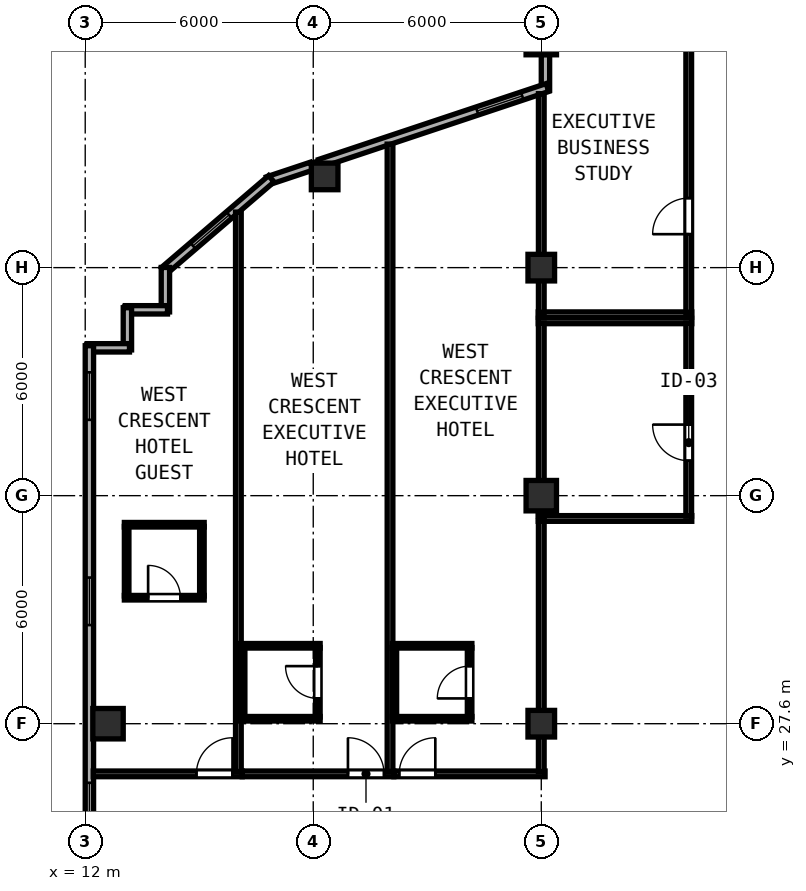
"""IFC4 building model, lengths in metres.
Left out: names, types, materials, properties, quantities, classifications, styles, units other than length and angle.
Written with IfcOpenShell. Run it as: python <this file> out.ifc"""

import sys

from ifc_helpers import new_model, si_unit, direction, frame, frame_2d, origin, origin_2d, place, context, subcontext, project, spatial, rectangle, hollow_rectangle, extrude, element, fill, save


model = new_model("IFC4")
c1 = context("Model", 3, precision=1e-05, world=origin(), true_north=direction((0.0, 1.0)))
c2 = subcontext(c1, "Body", "Model", "MODEL_VIEW")
j1 = project(units=[si_unit("LENGTHUNIT", "METRE"), si_unit("PLANEANGLEUNIT", "RADIAN")], contexts=[c1])
p1 = place(None, origin())
s1 = spatial("IfcSite", under=j1, at=p1, CompositionType="ELEMENT")
p2 = place(p1, origin())
s2 = spatial("IfcBuilding", under=s1, at=p2, CompositionType="ELEMENT")
p3 = place(p2, frame((0.0, 0.0, 269.85)))
s3 = spatial("IfcBuildingStorey", under=s2, at=p3, CompositionType="ELEMENT", Elevation=269.85)
for number, where, z_axis, x_axis in (
    (1, (24.0, 33.6, 0.0), (0.0, 0.0, 1.0), (1.0, 0.0, 0.0)),
    (2, (24.0, 45.6, 0.0), (0.0, 0.0, 1.0), (1.0, 0.0, 0.0)),
    (3, (12.6, 27.6, 0.0), (0.0, 0.0, 1.0), (1.0, 0.0, 0.0)),
):
    element("IfcColumn", number, at=place(p3, frame(where, z_axis=z_axis, x_axis=x_axis)), inside=s3, PredefinedType="COLUMN", context=c2, shape_type="SweptSolid", body=[
        extrude(hollow_rectangle(XDim=0.8, YDim=0.8, WallThickness=0.03, at=origin_2d()), origin(), (0.0, 0.0, 1.0), 3.85),
    ])
for number, where, z_axis, x_axis in (
    (4, (24.0, 27.6, 0.0), (0.0, 0.0, 1.0), (1.0, 0.0, 0.0)),
    (5, (24.0, 39.6, 0.0), (0.0, 0.0, 1.0), (1.0, 0.0, 0.0)),
    (6, (18.3, 42.0, 0.0), (0.0, 0.0, 1.0), (1.0, 0.0, 0.0)),
):
    element("IfcColumn", number, at=place(p3, frame(where, z_axis=z_axis, x_axis=x_axis)), inside=s3, PredefinedType="COLUMN", context=c2, shape_type="SweptSolid", body=[
        extrude(hollow_rectangle(XDim=0.7, YDim=0.7, WallThickness=0.026, at=origin_2d()), origin(), (0.0, 0.0, 1.0), 3.85),
    ])
p4 = place(p3, frame((24.11, 45.208, 0.0), z_axis=(0.0, 0.0, 1.0), x_axis=(0.0, -1.0, 0.0)))
e7 = element("IfcWall", 7, at=p4, inside=s3, PredefinedType="SOLIDWALL", context=c2, shape_type="SweptSolid", body=[
    extrude(rectangle(XDim=0.942, YDim=0.22, at=frame_2d((0.471, 0.0))), origin(), (0.0, 0.0, 1.0), 3.315),
])
p5 = place(p3, frame((24.162, 44.338, 0.0), z_axis=(0.0, 0.0, 1.0), x_axis=(-0.948687165594, -0.31621616315, 0.0)))
e8 = element("IfcWall", 8, at=p5, inside=s3, PredefinedType="SOLIDWALL", context=c2, shape_type="SweptSolid", body=[
    extrude(rectangle(XDim=6.312, YDim=0.22, at=frame_2d((3.156, 0.0))), origin(), (0.0, 0.0, 1.0), 3.315),
])
p6 = place(p5, frame((0.7, 0.0, 0.85)))
e9 = element("IfcOpeningElement", 9, at=p6, cuts=e8, PredefinedType="OPENING", context=c2, shape_type="SweptSolid", body=[
    extrude(rectangle(XDim=1.25, YDim=1.95, at=frame_2d((0.625, 0.975))), frame((0.0, 0.12, 0.0), z_axis=(0.0, -1.0, 0.0), x_axis=(1.0, 0.0, 0.0)), (0.0, 0.0, 1.0), 0.24),
])
p7 = place(p3, frame((17.958, 42.27, 0.0), z_axis=(0.0, 0.0, 1.0), x_axis=(-0.948683298051, -0.316227766017, 0.0)))
e10 = element("IfcWall", 10, at=p7, inside=s3, PredefinedType="SOLIDWALL", context=c2, shape_type="SweptSolid", body=[
    extrude(rectangle(XDim=1.218, YDim=0.22, at=frame_2d((0.609, 0.0))), origin(), (0.0, 0.0, 1.0), 3.67),
])
p8 = place(p3, frame((16.897, 41.938, 0.0), z_axis=(0.0, 0.0, 1.0), x_axis=(-0.759279729622, -0.650764390686, 0.0)))
e11 = element("IfcWall", 11, at=p8, inside=s3, PredefinedType="SOLIDWALL", context=c2, shape_type="SweptSolid", body=[
    extrude(rectangle(XDim=3.726, YDim=0.22, at=frame_2d((1.863, 0.0))), origin(), (0.0, 0.0, 1.0), 3.67),
])
p9 = place(p8, frame((1.464, 0.0, 0.85)))
e12 = element("IfcOpeningElement", 12, at=p9, cuts=e11, PredefinedType="OPENING", context=c2, shape_type="SweptSolid", body=[
    extrude(rectangle(XDim=1.25, YDim=1.95, at=frame_2d((0.625, 0.975))), frame((0.0, 0.12, 0.0), z_axis=(0.0, -1.0, 0.0), x_axis=(1.0, 0.0, 0.0)), (0.0, 0.0, 1.0), 0.24),
])
p10 = place(p3, frame((14.11, 39.604, 0.0), z_axis=(0.0, 0.0, 1.0), x_axis=(0.0, -1.0, 0.0)))
e13 = element("IfcWall", 13, at=p10, inside=s3, PredefinedType="SOLIDWALL", context=c2, shape_type="SweptSolid", body=[
    extrude(rectangle(XDim=1.169, YDim=0.22, at=frame_2d((0.585, 0.0))), origin(), (0.0, 0.0, 1.0), 3.67),
])
p11 = place(p3, frame((14.165, 38.49, 0.0), z_axis=(0.0, 0.0, 1.0), x_axis=(-1.0, 0.0, 0.0)))
e14 = element("IfcWall", 14, at=p11, inside=s3, PredefinedType="SOLIDWALL", context=c2, shape_type="SweptSolid", body=[
    extrude(rectangle(XDim=1.11, YDim=0.22, at=frame_2d((0.555, 0.0))), origin(), (0.0, 0.0, 1.0), 3.67),
])
p12 = place(p3, frame((13.11, 38.545, 0.0), z_axis=(0.0, 0.0, 1.0), x_axis=(0.0, -1.0, 0.0)))
e15 = element("IfcWall", 15, at=p12, inside=s3, PredefinedType="SOLIDWALL", context=c2, shape_type="SweptSolid", body=[
    extrude(rectangle(XDim=1.11, YDim=0.22, at=frame_2d((0.555, 0.0))), origin(), (0.0, 0.0, 1.0), 3.67),
])
p13 = place(p3, frame((13.165, 37.49, 0.0), z_axis=(0.0, 0.0, 1.0), x_axis=(-1.0, 0.0, 0.0)))
e16 = element("IfcWall", 16, at=p13, inside=s3, PredefinedType="SOLIDWALL", context=c2, shape_type="SweptSolid", body=[
    extrude(rectangle(XDim=1.11, YDim=0.22, at=frame_2d((0.555, 0.0))), origin(), (0.0, 0.0, 1.0), 3.67),
])
p14 = place(p3, frame((12.11, 37.545, 0.0), z_axis=(0.0, 0.0, 1.0), x_axis=(0.0, -1.0, 0.0)))
e17 = element("IfcWall", 17, at=p14, inside=s3, PredefinedType="SOLIDWALL", context=c2, shape_type="SweptSolid", body=[
    extrude(rectangle(XDim=21.145, YDim=0.22, at=frame_2d((10.573, 0.0))), origin(), (0.0, 0.0, 1.0), 3.67),
])
p15 = place(p14, frame((0.7, 0.0, 0.85)))
e18 = element("IfcOpeningElement", 18, at=p15, cuts=e17, PredefinedType="OPENING", context=c2, shape_type="SweptSolid", body=[
    extrude(rectangle(XDim=1.25, YDim=1.95, at=frame_2d((0.625, 0.975))), frame((0.0, 0.12, 0.0), z_axis=(0.0, -1.0, 0.0), x_axis=(1.0, 0.0, 0.0)), (0.0, 0.0, 1.0), 0.24),
])
p16 = place(p14, frame((6.1, 0.0, 0.85)))
e19 = element("IfcOpeningElement", 19, at=p16, cuts=e17, PredefinedType="OPENING", context=c2, shape_type="SweptSolid", body=[
    extrude(rectangle(XDim=1.25, YDim=1.95, at=frame_2d((0.625, 0.975))), frame((0.0, 0.12, 0.0), z_axis=(0.0, -1.0, 0.0), x_axis=(1.0, 0.0, 0.0)), (0.0, 0.0, 1.0), 0.24),
])
p17 = place(p14, frame((11.5, 0.0, 0.85)))
e20 = element("IfcOpeningElement", 20, at=p17, cuts=e17, PredefinedType="OPENING", context=c2, shape_type="SweptSolid", body=[
    extrude(rectangle(XDim=1.25, YDim=1.95, at=frame_2d((0.625, 0.975))), frame((0.0, 0.12, 0.0), z_axis=(0.0, -1.0, 0.0), x_axis=(1.0, 0.0, 0.0)), (0.0, 0.0, 1.0), 0.24),
])
p18 = place(p14, frame((16.9, 0.0, 0.85)))
e21 = element("IfcOpeningElement", 21, at=p18, cuts=e17, PredefinedType="OPENING", context=c2, shape_type="SweptSolid", body=[
    extrude(rectangle(XDim=1.25, YDim=1.95, at=frame_2d((0.625, 0.975))), frame((0.0, 0.12, 0.0), z_axis=(0.0, -1.0, 0.0), x_axis=(1.0, 0.0, 0.0)), (0.0, 0.0, 1.0), 0.24),
])
for number, where, z_axis, x_axis in (
    (22, (23.92, 38.2, 0.0), (0.0, 0.0, 1.0), (1.0, 0.0, 0.0)),
    (23, (23.92, 33.0, 0.0), (0.0, 0.0, 1.0), (1.0, 0.0, 0.0)),
):
    element("IfcWall", number, at=place(p3, frame(where, z_axis=z_axis, x_axis=x_axis)), inside=s3, PredefinedType="PARTITIONING", context=c2, shape_type="SweptSolid", body=[
        extrude(rectangle(XDim=4.04, YDim=0.15, at=frame_2d((2.02, 0.0))), origin(), (0.0, 0.0, 1.0), 3.67),
    ])
p19 = place(p3, frame((24.0, 33.06, 0.0), z_axis=(0.0, 0.0, 1.0), x_axis=(0.0, 1.0, 0.0)))
e24 = element("IfcWall", 24, at=p19, inside=s3, PredefinedType="PARTITIONING", context=c2, shape_type="SweptSolid", body=[
    extrude(rectangle(XDim=5.08, YDim=0.15, at=frame_2d((2.54, 0.0))), origin(), (0.0, 0.0, 1.0), 3.315),
])
p20 = place(p3, frame((27.88, 33.06, 0.0), z_axis=(0.0, 0.0, 1.0), x_axis=(0.0, 1.0, 0.0)))
e25 = element("IfcWall", 25, at=p20, inside=s3, PredefinedType="PARTITIONING", context=c2, shape_type="SweptSolid", body=[
    extrude(rectangle(XDim=5.08, YDim=0.15, at=frame_2d((2.54, 0.0))), origin(), (0.0, 0.0, 1.0), 3.67),
])
p21 = place(p20, frame((2.41, 0.0, 0.0), z_axis=(0.0, 0.0, 1.0), x_axis=(-1.0, 0.0, 0.0)))
e26 = element("IfcOpeningElement", 26, at=p21, cuts=e25, PredefinedType="OPENING", context=c2, shape_type="SweptSolid", body=[
    extrude(rectangle(XDim=0.95, YDim=2.12, at=frame_2d((0.475, 1.06))), frame((0.0, 0.085, 0.0), z_axis=(0.0, -1.0, 0.0), x_axis=(1.0, 0.0, 0.0)), (0.0, 0.0, 1.0), 0.17),
])
p22 = place(p3, frame((23.92, 38.36, 0.0), z_axis=(0.0, 0.0, 1.0), x_axis=(1.0, 0.0, 0.0)))
e27 = element("IfcWall", 27, at=p22, inside=s3, PredefinedType="PARTITIONING", context=c2, shape_type="SweptSolid", body=[
    extrude(rectangle(XDim=4.04, YDim=0.15, at=frame_2d((2.02, 0.0))), origin(), (0.0, 0.0, 1.0), 3.67),
])
p23 = place(p3, frame((24.0, 38.42, 0.0), z_axis=(0.0, 0.0, 1.0), x_axis=(0.0, 1.0, 0.0)))
e28 = element("IfcWall", 28, at=p23, inside=s3, PredefinedType="PARTITIONING", context=c2, shape_type="SweptSolid", body=[
    extrude(rectangle(XDim=5.757, YDim=0.15, at=frame_2d((2.878, 0.0))), origin(), (0.0, 0.0, 1.0), 3.315),
])
p24 = place(p3, frame((27.88, 38.42, 0.0), z_axis=(0.0, 0.0, 1.0), x_axis=(0.0, 1.0, 0.0)))
e29 = element("IfcWall", 29, at=p24, inside=s3, PredefinedType="PARTITIONING", context=c2, shape_type="SweptSolid", body=[
    extrude(rectangle(XDim=7.54, YDim=0.15, at=frame_2d((3.77, 0.0))), origin(), (0.0, 0.0, 1.0), 3.67),
])
p25 = place(p24, frame((3.01, 0.0, 0.0), z_axis=(0.0, 0.0, 1.0), x_axis=(-1.0, 0.0, 0.0)))
e30 = element("IfcOpeningElement", 30, at=p25, cuts=e29, PredefinedType="OPENING", context=c2, shape_type="SweptSolid", body=[
    extrude(rectangle(XDim=0.95, YDim=2.12, at=frame_2d((0.475, 1.06))), frame((0.0, 0.085, 0.0), z_axis=(0.0, -1.0, 0.0), x_axis=(1.0, 0.0, 0.0)), (0.0, 0.0, 1.0), 0.17),
])
p26 = place(p3, frame((12.212, 26.28, 0.0), z_axis=(0.0, 0.0, 1.0), x_axis=(1.0, 0.0, 0.0)))
e31 = element("IfcWall", 31, at=p26, inside=s3, PredefinedType="PARTITIONING", context=c2, shape_type="SweptSolid", body=[
    extrude(rectangle(XDim=3.918, YDim=0.15, at=frame_2d((1.959, 0.0))), origin(), (0.0, 0.0, 1.0), 3.67),
])
p27 = place(p26, frame((2.713, 0.0, 0.0)))
e32 = element("IfcOpeningElement", 32, at=p27, cuts=e31, PredefinedType="OPENING", context=c2, shape_type="SweptSolid", body=[
    extrude(rectangle(XDim=0.95, YDim=2.15, at=frame_2d((0.475, 1.075))), frame((0.0, 0.085, 0.0), z_axis=(0.0, -1.0, 0.0), x_axis=(1.0, 0.0, 0.0)), (0.0, 0.0, 1.0), 0.17),
])
p28 = place(p3, frame((16.03, 26.34, 0.0), z_axis=(0.0, 0.0, 1.0), x_axis=(0.0, 1.0, 0.0)))
e33 = element("IfcWall", 33, at=p28, inside=s3, PredefinedType="PARTITIONING", context=c2, shape_type="SweptSolid", body=[
    extrude(rectangle(XDim=14.721, YDim=0.15, at=frame_2d((7.36, 0.0))), origin(), (0.0, 0.0, 1.0), 3.67),
])
p29 = place(p3, frame((13.03, 32.835, 0.0), z_axis=(0.0, 0.0, 1.0), x_axis=(1.0, 0.0, 0.0)))
e34 = element("IfcWall", 34, at=p29, inside=s3, PredefinedType="PARTITIONING", context=c2, shape_type="SweptSolid", body=[
    extrude(rectangle(XDim=2.1, YDim=0.12, at=frame_2d((1.05, 0.0))), origin(), (0.0, 0.0, 1.0), 3.67),
])
p30 = place(p3, frame((13.03, 30.915, 0.0), z_axis=(0.0, 0.0, 1.0), x_axis=(1.0, 0.0, 0.0)))
e35 = element("IfcWall", 35, at=p30, inside=s3, PredefinedType="PARTITIONING", context=c2, shape_type="SweptSolid", body=[
    extrude(rectangle(XDim=2.1, YDim=0.12, at=frame_2d((1.05, 0.0))), origin(), (0.0, 0.0, 1.0), 3.67),
])
p31 = place(p30, frame((0.625, 0.0, 0.0)))
e36 = element("IfcOpeningElement", 36, at=p31, cuts=e35, PredefinedType="OPENING", context=c2, shape_type="SweptSolid", body=[
    extrude(rectangle(XDim=0.85, YDim=2.1, at=frame_2d((0.425, 1.05))), frame((0.0, 0.07, 0.0), z_axis=(0.0, -1.0, 0.0), x_axis=(1.0, 0.0, 0.0)), (0.0, 0.0, 1.0), 0.14),
])
for number, where, z_axis, x_axis in (
    (37, (13.09, 30.96, 0.0), (0.0, 0.0, 1.0), (0.0, 1.0, 0.0)),
    (38, (15.07, 30.96, 0.0), (0.0, 0.0, 1.0), (0.0, 1.0, 0.0)),
):
    element("IfcWall", number, at=place(p3, frame(where, z_axis=z_axis, x_axis=x_axis)), inside=s3, PredefinedType="PARTITIONING", context=c2, shape_type="SweptSolid", body=[
        extrude(rectangle(XDim=1.83, YDim=0.12, at=frame_2d((0.915, 0.0))), origin(), (0.0, 0.0, 1.0), 3.67),
    ])
p32 = place(p3, frame((16.132, 26.28, 0.0), z_axis=(0.0, 0.0, 1.0), x_axis=(1.0, 0.0, 0.0)))
e39 = element("IfcWall", 39, at=p32, inside=s3, PredefinedType="PARTITIONING", context=c2, shape_type="SweptSolid", body=[
    extrude(rectangle(XDim=3.988, YDim=0.15, at=frame_2d((1.994, 0.0))), origin(), (0.0, 0.0, 1.0), 3.67),
])
p33 = place(p32, frame((2.781, 0.0, 0.0)))
e40 = element("IfcOpeningElement", 40, at=p33, cuts=e39, PredefinedType="OPENING", context=c2, shape_type="SweptSolid", body=[
    extrude(rectangle(XDim=0.95, YDim=2.18, at=frame_2d((0.475, 1.09))), frame((0.0, 0.085, 0.0), z_axis=(0.0, -1.0, 0.0), x_axis=(1.0, 0.0, 0.0)), (0.0, 0.0, 1.0), 0.17),
])
p34 = place(p3, frame((20.02, 26.34, 0.0), z_axis=(0.0, 0.0, 1.0), x_axis=(0.0, 1.0, 0.0)))
e41 = element("IfcWall", 41, at=p34, inside=s3, PredefinedType="PARTITIONING", context=c2, shape_type="SweptSolid", body=[
    extrude(rectangle(XDim=16.51, YDim=0.15, at=frame_2d((8.255, 0.0))), origin(), (0.0, 0.0, 1.0), 3.67),
])
p35 = place(p3, frame((16.09, 29.65, 0.0), z_axis=(0.0, 0.0, 1.0), x_axis=(1.0, 0.0, 0.0)))
e42 = element("IfcWall", 42, at=p35, inside=s3, PredefinedType="PARTITIONING", context=c2, shape_type="SweptSolid", body=[
    extrude(rectangle(XDim=2.091, YDim=0.12, at=frame_2d((1.046, 0.0))), origin(), (0.0, 0.0, 1.0), 3.67),
])
p36 = place(p3, frame((16.09, 27.73, 0.0), z_axis=(0.0, 0.0, 1.0), x_axis=(1.0, 0.0, 0.0)))
e43 = element("IfcWall", 43, at=p36, inside=s3, PredefinedType="PARTITIONING", context=c2, shape_type="SweptSolid", body=[
    extrude(rectangle(XDim=2.091, YDim=0.12, at=frame_2d((1.046, 0.0))), origin(), (0.0, 0.0, 1.0), 3.315),
])
p37 = place(p3, frame((16.141, 27.775, 0.0), z_axis=(0.0, 0.0, 1.0), x_axis=(0.0, 1.0, 0.0)))
e44 = element("IfcWall", 44, at=p37, inside=s3, PredefinedType="PARTITIONING", context=c2, shape_type="SweptSolid", body=[
    extrude(rectangle(XDim=1.83, YDim=0.12, at=frame_2d((0.915, 0.0))), origin(), (0.0, 0.0, 1.0), 3.67),
])
p38 = place(p3, frame((18.121, 27.775, 0.0), z_axis=(0.0, 0.0, 1.0), x_axis=(0.0, 1.0, 0.0)))
e45 = element("IfcWall", 45, at=p38, inside=s3, PredefinedType="PARTITIONING", context=c2, shape_type="SweptSolid", body=[
    extrude(rectangle(XDim=1.83, YDim=0.12, at=frame_2d((0.915, 0.0))), origin(), (0.0, 0.0, 1.0), 3.67),
])
p39 = place(p38, frame((0.49, 0.0, 0.0)))
e46 = element("IfcOpeningElement", 46, at=p39, cuts=e45, PredefinedType="OPENING", context=c2, shape_type="SweptSolid", body=[
    extrude(rectangle(XDim=0.85, YDim=2.1, at=frame_2d((0.425, 1.05))), frame((0.0, 0.07, 0.0), z_axis=(0.0, -1.0, 0.0), x_axis=(1.0, 0.0, 0.0)), (0.0, 0.0, 1.0), 0.14),
])
p40 = place(p3, frame((20.122, 26.28, 0.0), z_axis=(0.0, 0.0, 1.0), x_axis=(1.0, 0.0, 0.0)))
e47 = element("IfcWall", 47, at=p40, inside=s3, PredefinedType="PARTITIONING", context=c2, shape_type="SweptSolid", body=[
    extrude(rectangle(XDim=3.978, YDim=0.15, at=frame_2d((1.989, 0.0))), origin(), (0.0, 0.0, 1.0), 3.67),
])
p41 = place(p40, frame((0.14, 0.0, 0.0)))
e48 = element("IfcOpeningElement", 48, at=p41, cuts=e47, PredefinedType="OPENING", context=c2, shape_type="SweptSolid", body=[
    extrude(rectangle(XDim=0.95, YDim=2.18, at=frame_2d((0.475, 1.09))), frame((0.0, 0.085, 0.0), z_axis=(0.0, -1.0, 0.0), x_axis=(1.0, 0.0, 0.0)), (0.0, 0.0, 1.0), 0.17),
])
p42 = place(p3, frame((24.0, 26.34, 0.0), z_axis=(0.0, 0.0, 1.0), x_axis=(0.0, 1.0, 0.0)))
e49 = element("IfcWall", 49, at=p42, inside=s3, PredefinedType="PARTITIONING", context=c2, shape_type="SweptSolid", body=[
    extrude(rectangle(XDim=6.6, YDim=0.15, at=frame_2d((3.3, 0.0))), origin(), (0.0, 0.0, 1.0), 3.315),
])
p43 = place(p3, frame((20.08, 29.65, 0.0), z_axis=(0.0, 0.0, 1.0), x_axis=(1.0, 0.0, 0.0)))
e50 = element("IfcWall", 50, at=p43, inside=s3, PredefinedType="PARTITIONING", context=c2, shape_type="SweptSolid", body=[
    extrude(rectangle(XDim=2.094, YDim=0.12, at=frame_2d((1.047, 0.0))), origin(), (0.0, 0.0, 1.0), 3.67),
])
p44 = place(p3, frame((20.08, 27.73, 0.0), z_axis=(0.0, 0.0, 1.0), x_axis=(1.0, 0.0, 0.0)))
e51 = element("IfcWall", 51, at=p44, inside=s3, PredefinedType="PARTITIONING", context=c2, shape_type="SweptSolid", body=[
    extrude(rectangle(XDim=2.094, YDim=0.12, at=frame_2d((1.047, 0.0))), origin(), (0.0, 0.0, 1.0), 3.315),
])
p45 = place(p3, frame((20.134, 27.775, 0.0), z_axis=(0.0, 0.0, 1.0), x_axis=(0.0, 1.0, 0.0)))
e52 = element("IfcWall", 52, at=p45, inside=s3, PredefinedType="PARTITIONING", context=c2, shape_type="SweptSolid", body=[
    extrude(rectangle(XDim=1.83, YDim=0.12, at=frame_2d((0.915, 0.0))), origin(), (0.0, 0.0, 1.0), 3.67),
])
p46 = place(p3, frame((22.114, 27.775, 0.0), z_axis=(0.0, 0.0, 1.0), x_axis=(0.0, 1.0, 0.0)))
e53 = element("IfcWall", 53, at=p46, inside=s3, PredefinedType="PARTITIONING", context=c2, shape_type="SweptSolid", body=[
    extrude(rectangle(XDim=1.83, YDim=0.12, at=frame_2d((0.915, 0.0))), origin(), (0.0, 0.0, 1.0), 3.67),
])
p47 = place(p46, frame((0.49, 0.0, 0.0)))
e54 = element("IfcOpeningElement", 54, at=p47, cuts=e53, PredefinedType="OPENING", context=c2, shape_type="SweptSolid", body=[
    extrude(rectangle(XDim=0.85, YDim=2.1, at=frame_2d((0.425, 1.05))), frame((0.0, 0.07, 0.0), z_axis=(0.0, -1.0, 0.0), x_axis=(1.0, 0.0, 0.0)), (0.0, 0.0, 1.0), 0.14),
])
p48 = place(p6, origin())
e55 = element("IfcWindow", 55, at=p48, inside=s3, PartitioningType="SINGLE_PANEL", PredefinedType="WINDOW", context=c2, shape_type="SweptSolid", body=[
    extrude(rectangle(XDim=1.25, YDim=1.95, at=frame_2d((0.625, 0.975))), frame((0.0, 0.03, 0.0), z_axis=(0.0, -1.0, 0.0), x_axis=(1.0, 0.0, 0.0)), (0.0, 0.0, 1.0), 0.06),
])
fill(e9, e55)
p49 = place(p9, origin())
e56 = element("IfcWindow", 56, at=p49, inside=s3, PartitioningType="SINGLE_PANEL", PredefinedType="WINDOW", context=c2, shape_type="SweptSolid", body=[
    extrude(rectangle(XDim=1.25, YDim=1.95, at=frame_2d((0.625, 0.975))), frame((0.0, 0.03, 0.0), z_axis=(0.0, -1.0, 0.0), x_axis=(1.0, 0.0, 0.0)), (0.0, 0.0, 1.0), 0.06),
])
fill(e12, e56)
p50 = place(p15, origin())
e57 = element("IfcWindow", 57, at=p50, inside=s3, PartitioningType="SINGLE_PANEL", PredefinedType="WINDOW", context=c2, shape_type="SweptSolid", body=[
    extrude(rectangle(XDim=1.25, YDim=1.95, at=frame_2d((0.625, 0.975))), frame((0.0, 0.03, 0.0), z_axis=(0.0, -1.0, 0.0), x_axis=(1.0, 0.0, 0.0)), (0.0, 0.0, 1.0), 0.06),
])
fill(e18, e57)
p51 = place(p16, origin())
e58 = element("IfcWindow", 58, at=p51, inside=s3, PartitioningType="SINGLE_PANEL", PredefinedType="WINDOW", context=c2, shape_type="SweptSolid", body=[
    extrude(rectangle(XDim=1.25, YDim=1.95, at=frame_2d((0.625, 0.975))), frame((0.0, 0.03, 0.0), z_axis=(0.0, -1.0, 0.0), x_axis=(1.0, 0.0, 0.0)), (0.0, 0.0, 1.0), 0.06),
])
fill(e19, e58)
p52 = place(p17, origin())
e59 = element("IfcWindow", 59, at=p52, inside=s3, PartitioningType="SINGLE_PANEL", PredefinedType="WINDOW", context=c2, shape_type="SweptSolid", body=[
    extrude(rectangle(XDim=1.25, YDim=1.95, at=frame_2d((0.625, 0.975))), frame((0.0, 0.03, 0.0), z_axis=(0.0, -1.0, 0.0), x_axis=(1.0, 0.0, 0.0)), (0.0, 0.0, 1.0), 0.06),
])
fill(e20, e59)
p53 = place(p21, origin())
e60 = element("IfcDoor", 60, at=p53, inside=s3, OperationType="SINGLE_SWING_LEFT", PredefinedType="DOOR", context=c2, shape_type="SweptSolid", body=[
    extrude(rectangle(XDim=0.95, YDim=2.12, at=frame_2d((0.475, 1.06))), frame((0.0, 0.025, 0.0), z_axis=(0.0, -1.0, 0.0), x_axis=(1.0, 0.0, 0.0)), (0.0, 0.0, 1.0), 0.05),
])
fill(e26, e60)
p54 = place(p25, origin())
e61 = element("IfcDoor", 61, at=p54, inside=s3, OperationType="SINGLE_SWING_RIGHT", PredefinedType="DOOR", context=c2, shape_type="SweptSolid", body=[
    extrude(rectangle(XDim=0.95, YDim=2.12, at=frame_2d((0.475, 1.06))), frame((0.0, 0.025, 0.0), z_axis=(0.0, -1.0, 0.0), x_axis=(1.0, 0.0, 0.0)), (0.0, 0.0, 1.0), 0.05),
])
fill(e30, e61)
p55 = place(p27, origin())
e62 = element("IfcDoor", 62, at=p55, inside=s3, OperationType="SINGLE_SWING_RIGHT", PredefinedType="DOOR", context=c2, shape_type="SweptSolid", body=[
    extrude(rectangle(XDim=0.95, YDim=2.15, at=frame_2d((0.475, 1.075))), frame((0.0, 0.025, 0.0), z_axis=(0.0, -1.0, 0.0), x_axis=(1.0, 0.0, 0.0)), (0.0, 0.0, 1.0), 0.05),
])
fill(e32, e62)
p56 = place(p31, origin())
e63 = element("IfcDoor", 63, at=p56, inside=s3, OperationType="SINGLE_SWING_LEFT", PredefinedType="DOOR", context=c2, shape_type="SweptSolid", body=[
    extrude(rectangle(XDim=0.85, YDim=2.1, at=frame_2d((0.425, 1.05))), frame((0.0, 0.025, 0.0), z_axis=(0.0, -1.0, 0.0), x_axis=(1.0, 0.0, 0.0)), (0.0, 0.0, 1.0), 0.05),
])
fill(e36, e63)
p57 = place(p33, origin())
e64 = element("IfcDoor", 64, at=p57, inside=s3, OperationType="SINGLE_SWING_LEFT", PredefinedType="DOOR", context=c2, shape_type="SweptSolid", body=[
    extrude(rectangle(XDim=0.95, YDim=2.18, at=frame_2d((0.475, 1.09))), frame((0.0, 0.025, 0.0), z_axis=(0.0, -1.0, 0.0), x_axis=(1.0, 0.0, 0.0)), (0.0, 0.0, 1.0), 0.05),
])
fill(e40, e64)
p58 = place(p39, origin())
e65 = element("IfcDoor", 65, at=p58, inside=s3, OperationType="SINGLE_SWING_RIGHT", PredefinedType="DOOR", context=c2, shape_type="SweptSolid", body=[
    extrude(rectangle(XDim=0.85, YDim=2.1, at=frame_2d((0.425, 1.05))), frame((0.0, 0.025, 0.0), z_axis=(0.0, -1.0, 0.0), x_axis=(1.0, 0.0, 0.0)), (0.0, 0.0, 1.0), 0.05),
])
fill(e46, e65)
p59 = place(p41, origin())
e66 = element("IfcDoor", 66, at=p59, inside=s3, OperationType="SINGLE_SWING_RIGHT", PredefinedType="DOOR", context=c2, shape_type="SweptSolid", body=[
    extrude(rectangle(XDim=0.95, YDim=2.18, at=frame_2d((0.475, 1.09))), frame((0.0, 0.025, 0.0), z_axis=(0.0, -1.0, 0.0), x_axis=(1.0, 0.0, 0.0)), (0.0, 0.0, 1.0), 0.05),
])
fill(e48, e66)
p60 = place(p47, origin())
e67 = element("IfcDoor", 67, at=p60, inside=s3, OperationType="SINGLE_SWING_LEFT", PredefinedType="DOOR", context=c2, shape_type="SweptSolid", body=[
    extrude(rectangle(XDim=0.85, YDim=2.1, at=frame_2d((0.425, 1.05))), frame((0.0, 0.025, 0.0), z_axis=(0.0, -1.0, 0.0), x_axis=(1.0, 0.0, 0.0)), (0.0, 0.0, 1.0), 0.05),
])
fill(e54, e67)
save(model, sys.argv[1])
